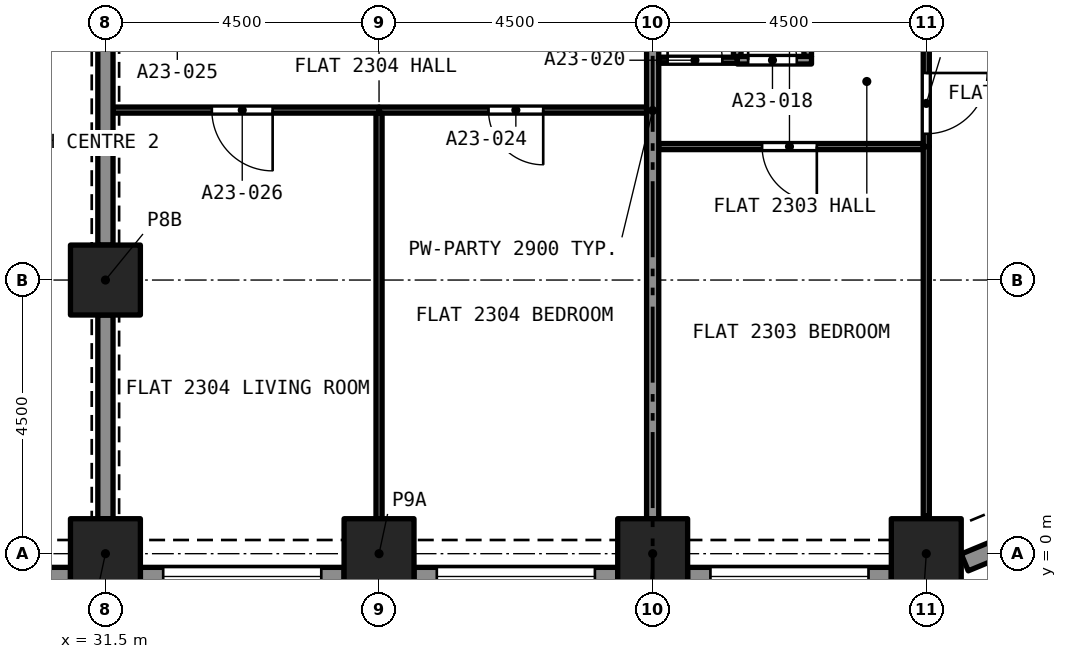
"""IFC4 building model, lengths in metres.
Left out: names, types, materials, properties, quantities, classifications, styles, units other than length and angle.
Written with IfcOpenShell. Run it as: python <this file> out.ifc"""

import sys

from ifc_helpers import new_model, si_unit, direction, frame, frame_2d, origin, origin_2d, place, context, subcontext, project, spatial, rectangle, extrude, element, fill, save


model = new_model("IFC4")
c1 = context("Model", 3, precision=1e-05, world=origin(), true_north=direction((0.0, 1.0)))
c2 = subcontext(c1, "Body", "Model", "MODEL_VIEW")
j1 = project(units=[si_unit("LENGTHUNIT", "METRE"), si_unit("PLANEANGLEUNIT", "RADIAN")], contexts=[c1])
p1 = place(None, origin())
s1 = spatial("IfcSite", under=j1, at=p1, CompositionType="ELEMENT")
p2 = place(p1, origin())
s2 = spatial("IfcBuilding", under=s1, at=p2, CompositionType="ELEMENT")
p3 = place(p2, frame((0.0, 0.0, 86.4)))
s3 = spatial("IfcBuildingStorey", under=s2, at=p3, CompositionType="ELEMENT", Elevation=86.4)
for number, where, z_axis, x_axis in (
    (1, (31.5, 0.0, 0.0), (0.0, 0.0, 1.0), (1.0, 0.0, 0.0)),
    (2, (36.0, 0.0, 0.0), (0.0, 0.0, 1.0), (1.0, 0.0, 0.0)),
    (3, (40.5, 0.0, 0.0), (0.0, 0.0, 1.0), (1.0, 0.0, 0.0)),
    (4, (45.0, 0.0, 0.0), (0.0, 0.0, 1.0), (1.0, 0.0, 0.0)),
    (5, (31.5, 4.5, 0.0), (0.0, 0.0, 1.0), (1.0, 0.0, 0.0)),
):
    element("IfcColumn", number, at=place(p3, frame(where, z_axis=z_axis, x_axis=x_axis)), inside=s3, PredefinedType="COLUMN", context=c2, shape_type="SweptSolid", body=[
        extrude(rectangle(XDim=1.15, YDim=1.15, at=origin_2d()), origin(), (0.0, 0.0, 1.0), 3.2),
    ])
p4 = place(p3, frame((30.925, -0.375, 0.0), z_axis=(0.0, 0.0, 1.0), x_axis=(-1.0, 0.0, 0.0)))
e6 = element("IfcWall", 6, at=p4, inside=s3, PredefinedType="SOLIDWALL", context=c2, shape_type="SweptSolid", body=[
    extrude(rectangle(XDim=3.35, YDim=0.3, at=frame_2d((1.675, 0.0))), origin(), (0.0, 0.0, 1.0), 3.2),
])
p5 = place(p4, frame((0.375, 0.0, 0.45)))
e7 = element("IfcOpeningElement", 7, at=p5, cuts=e6, PredefinedType="OPENING", context=c2, shape_type="SweptSolid", body=[
    extrude(rectangle(XDim=2.6, YDim=1.95, at=frame_2d((1.3, 0.975))), frame((0.0, 0.16, 0.0), z_axis=(0.0, -1.0, 0.0), x_axis=(1.0, 0.0, 0.0)), (0.0, 0.0, 1.0), 0.32),
])
p6 = place(p3, frame((35.425, -0.375, 0.0), z_axis=(0.0, 0.0, 1.0), x_axis=(-1.0, 0.0, 0.0)))
e8 = element("IfcWall", 8, at=p6, inside=s3, PredefinedType="SOLIDWALL", context=c2, shape_type="SweptSolid", body=[
    extrude(rectangle(XDim=3.35, YDim=0.3, at=frame_2d((1.675, 0.0))), origin(), (0.0, 0.0, 1.0), 3.2),
])
p7 = place(p6, frame((0.375, 0.0, 0.45)))
e9 = element("IfcOpeningElement", 9, at=p7, cuts=e8, PredefinedType="OPENING", context=c2, shape_type="SweptSolid", body=[
    extrude(rectangle(XDim=2.6, YDim=1.95, at=frame_2d((1.3, 0.975))), frame((0.0, 0.16, 0.0), z_axis=(0.0, -1.0, 0.0), x_axis=(1.0, 0.0, 0.0)), (0.0, 0.0, 1.0), 0.32),
])
p8 = place(p3, frame((39.925, -0.375, 0.0), z_axis=(0.0, 0.0, 1.0), x_axis=(-1.0, 0.0, 0.0)))
e10 = element("IfcWall", 10, at=p8, inside=s3, PredefinedType="SOLIDWALL", context=c2, shape_type="SweptSolid", body=[
    extrude(rectangle(XDim=3.35, YDim=0.3, at=frame_2d((1.675, 0.0))), origin(), (0.0, 0.0, 1.0), 3.2),
])
p9 = place(p8, frame((0.375, 0.0, 0.45)))
e11 = element("IfcOpeningElement", 11, at=p9, cuts=e10, PredefinedType="OPENING", context=c2, shape_type="SweptSolid", body=[
    extrude(rectangle(XDim=2.6, YDim=1.95, at=frame_2d((1.3, 0.975))), frame((0.0, 0.16, 0.0), z_axis=(0.0, -1.0, 0.0), x_axis=(1.0, 0.0, 0.0)), (0.0, 0.0, 1.0), 0.32),
])
p10 = place(p3, frame((44.425, -0.375, 0.0), z_axis=(0.0, 0.0, 1.0), x_axis=(-1.0, 0.0, 0.0)))
e12 = element("IfcWall", 12, at=p10, inside=s3, PredefinedType="SOLIDWALL", context=c2, shape_type="SweptSolid", body=[
    extrude(rectangle(XDim=3.35, YDim=0.3, at=frame_2d((1.675, 0.0))), origin(), (0.0, 0.0, 1.0), 3.2),
])
p11 = place(p10, frame((0.375, 0.0, 0.45)))
e13 = element("IfcOpeningElement", 13, at=p11, cuts=e12, PredefinedType="OPENING", context=c2, shape_type="SweptSolid", body=[
    extrude(rectangle(XDim=2.6, YDim=1.95, at=frame_2d((1.3, 0.975))), frame((0.0, 0.16, 0.0), z_axis=(0.0, -1.0, 0.0), x_axis=(1.0, 0.0, 0.0)), (0.0, 0.0, 1.0), 0.32),
])
p12 = place(p3, frame((47.631, 0.684, 0.0), z_axis=(0.0, 0.0, 1.0), x_axis=(-0.923862802911, -0.382723818695, 0.0)))
e14 = element("IfcWall", 14, at=p12, inside=s3, PredefinedType="SOLIDWALL", context=c2, shape_type="SweptSolid", body=[
    extrude(rectangle(XDim=2.164, YDim=0.3, at=frame_2d((1.082, 0.0))), origin(), (0.0, 0.0, 1.0), 3.2),
])
p13 = place(p12, frame((0.271, 0.0, 0.45)))
e15 = element("IfcOpeningElement", 15, at=p13, cuts=e14, PredefinedType="OPENING", context=c2, shape_type="SweptSolid", body=[
    extrude(rectangle(XDim=1.4, YDim=1.95, at=frame_2d((0.7, 0.975))), frame((0.0, 0.16, 0.0), z_axis=(0.0, -1.0, 0.0), x_axis=(1.0, 0.0, 0.0)), (0.0, 0.0, 1.0), 0.32),
])
p14 = place(p3, frame((43.05, 8.177, 0.0), z_axis=(0.0, 0.0, 1.0), x_axis=(0.0, 1.0, 0.0)))
e16 = element("IfcWall", 16, at=p14, inside=s3, PredefinedType="PARTITIONING", context=c2, shape_type="SweptSolid", body=[
    extrude(rectangle(XDim=5.823, YDim=0.125, at=frame_2d((2.911, 0.0))), origin(), (0.0, 0.0, 1.0), 2.9),
])
p15 = place(p3, frame((41.891, 8.115, 0.0), z_axis=(0.0, 0.0, 1.0), x_axis=(1.0, 0.0, 0.0)))
e17 = element("IfcWall", 17, at=p15, inside=s3, PredefinedType="PARTITIONING", context=c2, shape_type="SweptSolid", body=[
    extrude(rectangle(XDim=1.222, YDim=0.125, at=frame_2d((0.611, 0.0))), origin(), (0.0, 0.0, 1.0), 2.9),
])
p16 = place(p15, frame((0.179, 0.0, 0.0)))
e18 = element("IfcOpeningElement", 18, at=p16, cuts=e17, PredefinedType="OPENING", context=c2, shape_type="SweptSolid", body=[
    extrude(rectangle(XDim=0.8, YDim=2.1, at=frame_2d((0.4, 1.05))), frame((0.0, 0.073, 0.0), z_axis=(0.0, -1.0, 0.0), x_axis=(1.0, 0.0, 0.0)), (0.0, 0.0, 1.0), 0.145),
])
p17 = place(p3, frame((41.891, 8.177, 0.0), z_axis=(0.0, 0.0, 1.0), x_axis=(0.0, 1.0, 0.0)))
e19 = element("IfcWall", 19, at=p17, inside=s3, PredefinedType="PARTITIONING", context=c2, shape_type="SweptSolid", body=[
    extrude(rectangle(XDim=5.823, YDim=0.125, at=frame_2d((2.911, 0.0))), origin(), (0.0, 0.0, 1.0), 2.9),
])
p18 = place(p3, frame((44.95, 6.695, 0.0), z_axis=(0.0, 0.0, 1.0), x_axis=(-1.0, 0.0, 0.0)))
e20 = element("IfcWall", 20, at=p18, inside=s3, PredefinedType="PARTITIONING", context=c2, shape_type="SweptSolid", body=[
    extrude(rectangle(XDim=4.35, YDim=0.1, at=frame_2d((2.175, 0.0))), origin(), (0.0, 0.0, 1.0), 2.9),
])
p19 = place(p18, frame((1.75, 0.0, 0.0)))
e21 = element("IfcOpeningElement", 21, at=p19, cuts=e20, PredefinedType="OPENING", context=c2, shape_type="SweptSolid", body=[
    extrude(rectangle(XDim=0.9, YDim=2.1, at=frame_2d((0.45, 1.05))), frame((0.0, 0.06, 0.0), z_axis=(0.0, -1.0, 0.0), x_axis=(1.0, 0.0, 0.0)), (0.0, 0.0, 1.0), 0.12),
])
p20 = place(p3, frame((45.0, 0.622, 0.0), z_axis=(0.0, 0.0, 1.0), x_axis=(0.0, 1.0, 0.0)))
e22 = element("IfcWall", 22, at=p20, inside=s3, PredefinedType="PARTITIONING", context=c2, shape_type="SweptSolid", body=[
    extrude(rectangle(XDim=6.073, YDim=0.1, at=frame_2d((3.036, 0.0))), origin(), (0.0, 0.0, 1.0), 2.9),
])
p21 = place(p3, frame((40.5, 0.575, 0.0), z_axis=(0.0, 0.0, 1.0), x_axis=(0.0, 1.0, 0.0)))
e23 = element("IfcWall", 23, at=p21, inside=s3, PredefinedType="PARTITIONING", context=c2, shape_type="SweptSolid", body=[
    extrude(rectangle(XDim=13.425, YDim=0.2, at=frame_2d((6.712, 0.0))), origin(), (0.0, 0.0, 1.0), 2.9),
])
p22 = place(p3, frame((40.6, 8.115, 0.0), z_axis=(0.0, 0.0, 1.0), x_axis=(1.0, 0.0, 0.0)))
e24 = element("IfcWall", 24, at=p22, inside=s3, PredefinedType="PARTITIONING", context=c2, shape_type="SweptSolid", body=[
    extrude(rectangle(XDim=1.291, YDim=0.1, at=frame_2d((0.646, 0.0))), origin(), (0.0, 0.0, 1.0), 2.9),
])
p23 = place(p22, frame((0.146, 0.0, 0.0)))
e25 = element("IfcOpeningElement", 25, at=p23, cuts=e24, PredefinedType="OPENING", context=c2, shape_type="SweptSolid", body=[
    extrude(rectangle(XDim=0.9, YDim=2.1, at=frame_2d((0.45, 1.05))), frame((0.0, 0.06, 0.0), z_axis=(0.0, -1.0, 0.0), x_axis=(1.0, 0.0, 0.0)), (0.0, 0.0, 1.0), 0.12),
])
p24 = place(p3, frame((45.0, 14.0, 0.0), z_axis=(0.0, 0.0, 1.0), x_axis=(0.0, -1.0, 0.0)))
e26 = element("IfcWall", 26, at=p24, inside=s3, PredefinedType="PARTITIONING", context=c2, shape_type="SweptSolid", body=[
    extrude(rectangle(XDim=7.305, YDim=0.1, at=frame_2d((3.652, 0.0))), origin(), (0.0, 0.0, 1.0), 2.9),
])
p25 = place(p24, frame((6.095, 0.0, 0.0)))
e27 = element("IfcOpeningElement", 27, at=p25, cuts=e26, PredefinedType="OPENING", context=c2, shape_type="SweptSolid", body=[
    extrude(rectangle(XDim=1.0, YDim=2.1, at=frame_2d((0.5, 1.05))), frame((0.0, 0.06, 0.0), z_axis=(0.0, -1.0, 0.0), x_axis=(1.0, 0.0, 0.0)), (0.0, 0.0, 1.0), 0.12),
])
p26 = place(p3, frame((40.4, 7.295, 0.0), z_axis=(0.0, 0.0, 1.0), x_axis=(-1.0, 0.0, 0.0)))
e28 = element("IfcWall", 28, at=p26, inside=s3, PredefinedType="PARTITIONING", context=c2, shape_type="SweptSolid", body=[
    extrude(rectangle(XDim=4.4, YDim=0.1, at=frame_2d((2.2, 0.0))), origin(), (0.0, 0.0, 1.0), 2.9),
])
p27 = place(p26, frame((1.7, 0.0, 0.0)))
e29 = element("IfcOpeningElement", 29, at=p27, cuts=e28, PredefinedType="OPENING", context=c2, shape_type="SweptSolid", body=[
    extrude(rectangle(XDim=0.9, YDim=2.1, at=frame_2d((0.45, 1.05))), frame((0.0, 0.06, 0.0), z_axis=(0.0, -1.0, 0.0), x_axis=(1.0, 0.0, 0.0)), (0.0, 0.0, 1.0), 0.12),
])
p28 = place(p3, frame((36.0, 0.575, 0.0), z_axis=(0.0, 0.0, 1.0), x_axis=(0.0, 1.0, 0.0)))
e30 = element("IfcWall", 30, at=p28, inside=s3, PredefinedType="PARTITIONING", context=c2, shape_type="SweptSolid", body=[
    extrude(rectangle(XDim=6.67, YDim=0.1, at=frame_2d((3.335, 0.0))), origin(), (0.0, 0.0, 1.0), 2.9),
])
p29 = place(p3, frame((36.0, 7.295, 0.0), z_axis=(0.0, 0.0, 1.0), x_axis=(-1.0, 0.0, 0.0)))
e31 = element("IfcWall", 31, at=p29, inside=s3, PredefinedType="PARTITIONING", context=c2, shape_type="SweptSolid", body=[
    extrude(rectangle(XDim=4.375, YDim=0.1, at=frame_2d((2.188, 0.0))), origin(), (0.0, 0.0, 1.0), 2.9),
])
p30 = place(p29, frame((1.75, 0.0, 0.0)))
e32 = element("IfcOpeningElement", 32, at=p30, cuts=e31, PredefinedType="OPENING", context=c2, shape_type="SweptSolid", body=[
    extrude(rectangle(XDim=1.0, YDim=2.1, at=frame_2d((0.5, 1.05))), frame((0.0, 0.06, 0.0), z_axis=(0.0, -1.0, 0.0), x_axis=(1.0, 0.0, 0.0)), (0.0, 0.0, 1.0), 0.12),
])
for number, where, z_axis, x_axis in (
    (33, (31.5, 0.575, 0.0), (0.0, 0.0, 1.0), (0.0, 1.0, 0.0)),
    (34, (31.5, 5.075, 0.0), (0.0, 0.0, 1.0), (0.0, 1.0, 0.0)),
):
    element("IfcWall", number, at=place(p3, frame(where, z_axis=z_axis, x_axis=x_axis)), inside=s3, PredefinedType="PARTITIONING", context=c2, shape_type="SweptSolid", body=[
        extrude(rectangle(XDim=3.35, YDim=0.25, at=frame_2d((1.675, 0.0))), origin(), (0.0, 0.0, 1.0), 2.38),
    ])
p31 = place(p7, origin())
e35 = element("IfcWindow", 35, at=p31, inside=s3, PartitioningType="SINGLE_PANEL", PredefinedType="WINDOW", context=c2, shape_type="SweptSolid", body=[
    extrude(rectangle(XDim=2.6, YDim=1.95, at=frame_2d((1.3, 0.975))), frame((0.0, 0.03, 0.0), z_axis=(0.0, -1.0, 0.0), x_axis=(1.0, 0.0, 0.0)), (0.0, 0.0, 1.0), 0.06),
])
fill(e9, e35)
p32 = place(p9, origin())
e36 = element("IfcWindow", 36, at=p32, inside=s3, PartitioningType="SINGLE_PANEL", PredefinedType="WINDOW", context=c2, shape_type="SweptSolid", body=[
    extrude(rectangle(XDim=2.6, YDim=1.95, at=frame_2d((1.3, 0.975))), frame((0.0, 0.03, 0.0), z_axis=(0.0, -1.0, 0.0), x_axis=(1.0, 0.0, 0.0)), (0.0, 0.0, 1.0), 0.06),
])
fill(e11, e36)
p33 = place(p11, origin())
e37 = element("IfcWindow", 37, at=p33, inside=s3, PartitioningType="SINGLE_PANEL", PredefinedType="WINDOW", context=c2, shape_type="SweptSolid", body=[
    extrude(rectangle(XDim=2.6, YDim=1.95, at=frame_2d((1.3, 0.975))), frame((0.0, 0.03, 0.0), z_axis=(0.0, -1.0, 0.0), x_axis=(1.0, 0.0, 0.0)), (0.0, 0.0, 1.0), 0.06),
])
fill(e13, e37)
p34 = place(p16, origin())
e38 = element("IfcDoor", 38, at=p34, inside=s3, OperationType="SINGLE_SWING_LEFT", PredefinedType="DOOR", context=c2, shape_type="SweptSolid", body=[
    extrude(rectangle(XDim=0.8, YDim=2.1, at=frame_2d((0.4, 1.05))), frame((0.0, 0.025, 0.0), z_axis=(0.0, -1.0, 0.0), x_axis=(1.0, 0.0, 0.0)), (0.0, 0.0, 1.0), 0.05),
])
fill(e18, e38)
p35 = place(p19, origin())
e39 = element("IfcDoor", 39, at=p35, inside=s3, OperationType="SINGLE_SWING_RIGHT", PredefinedType="DOOR", context=c2, shape_type="SweptSolid", body=[
    extrude(rectangle(XDim=0.9, YDim=2.1, at=frame_2d((0.45, 1.05))), frame((0.0, 0.025, 0.0), z_axis=(0.0, -1.0, 0.0), x_axis=(1.0, 0.0, 0.0)), (0.0, 0.0, 1.0), 0.05),
])
fill(e21, e39)
p36 = place(p23, origin())
e40 = element("IfcDoor", 40, at=p36, inside=s3, OperationType="SINGLE_SWING_LEFT", PredefinedType="DOOR", context=c2, shape_type="SweptSolid", body=[
    extrude(rectangle(XDim=0.9, YDim=2.1, at=frame_2d((0.45, 1.05))), frame((0.0, 0.025, 0.0), z_axis=(0.0, -1.0, 0.0), x_axis=(1.0, 0.0, 0.0)), (0.0, 0.0, 1.0), 0.05),
])
fill(e25, e40)
p37 = place(p25, origin())
e41 = element("IfcDoor", 41, at=p37, inside=s3, OperationType="SINGLE_SWING_RIGHT", PredefinedType="DOOR", context=c2, shape_type="SweptSolid", body=[
    extrude(rectangle(XDim=1.0, YDim=2.1, at=frame_2d((0.5, 1.05))), frame((0.0, 0.025, 0.0), z_axis=(0.0, -1.0, 0.0), x_axis=(1.0, 0.0, 0.0)), (0.0, 0.0, 1.0), 0.05),
])
fill(e27, e41)
p38 = place(p27, origin())
e42 = element("IfcDoor", 42, at=p38, inside=s3, OperationType="SINGLE_SWING_LEFT", PredefinedType="DOOR", context=c2, shape_type="SweptSolid", body=[
    extrude(rectangle(XDim=0.9, YDim=2.1, at=frame_2d((0.45, 1.05))), frame((0.0, 0.025, 0.0), z_axis=(0.0, -1.0, 0.0), x_axis=(1.0, 0.0, 0.0)), (0.0, 0.0, 1.0), 0.05),
])
fill(e29, e42)
p39 = place(p30, origin())
e43 = element("IfcDoor", 43, at=p39, inside=s3, OperationType="SINGLE_SWING_RIGHT", PredefinedType="DOOR", context=c2, shape_type="SweptSolid", body=[
    extrude(rectangle(XDim=1.0, YDim=2.1, at=frame_2d((0.5, 1.05))), frame((0.0, 0.025, 0.0), z_axis=(0.0, -1.0, 0.0), x_axis=(1.0, 0.0, 0.0)), (0.0, 0.0, 1.0), 0.05),
])
fill(e32, e43)
save(model, sys.argv[1])
